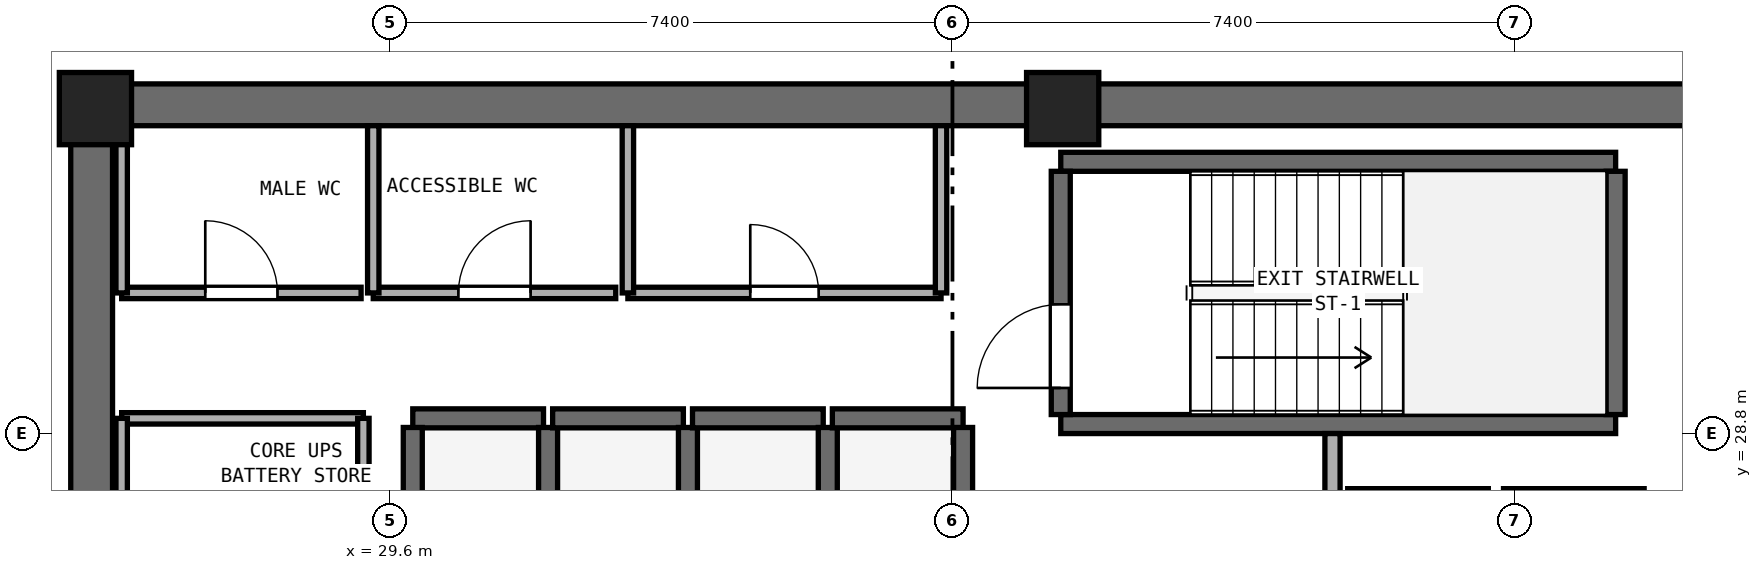
"""IFC4 building model, lengths in metres.
Left out: names, types, materials, properties, quantities, classifications, styles, units other than length and angle.
Written with IfcOpenShell. Run it as: python <this file> out.ifc"""

import sys

from ifc_helpers import new_model, si_unit, direction, frame, frame_2d, origin, origin_2d, place, context, subcontext, project, spatial, rectangle, extrude, element, fill, save


model = new_model("IFC4")
c1 = context("Model", 3, precision=1e-05, world=origin(), true_north=direction((0.0, 1.0)))
c2 = subcontext(c1, "Body", "Model", "MODEL_VIEW")
j1 = project(units=[si_unit("LENGTHUNIT", "METRE"), si_unit("PLANEANGLEUNIT", "RADIAN")], contexts=[c1])
p1 = place(None, origin())
s1 = spatial("IfcSite", under=j1, at=p1, CompositionType="ELEMENT")
p2 = place(p1, origin())
s2 = spatial("IfcBuilding", under=s1, at=p2, CompositionType="ELEMENT")
p3 = place(p2, frame((0.0, 0.0, 132.6)))
s3 = spatial("IfcBuildingStorey", under=s2, at=p3, CompositionType="ELEMENT", Elevation=132.6)
p4 = place(p3, frame((25.4, 33.125, 0.0), z_axis=(0.0, 0.0, 1.0), x_axis=(1.0, 0.0, 0.0)))
e1 = element("IfcWall", 1, at=p4, inside=s3, PredefinedType="SHEAR", context=c2, shape_type="SweptSolid", body=[
    extrude(rectangle(XDim=23.2, YDim=0.55, at=frame_2d((11.6, 0.0))), origin(), (0.0, 0.0, 1.0), 3.54),
])
p5 = place(p3, frame((25.675, 17.55, 0.0), z_axis=(0.0, 0.0, 1.0), x_axis=(0.0, 1.0, 0.0)))
e2 = element("IfcWall", 2, at=p5, inside=s3, PredefinedType="SHEAR", context=c2, shape_type="SweptSolid", body=[
    extrude(rectangle(XDim=15.3, YDim=0.55, at=frame_2d((7.65, 0.0))), origin(), (0.0, 0.0, 1.0), 3.54),
])
p6 = place(p5, frame((6.9, 0.0, 0.0)))
e3 = element("IfcOpeningElement", 3, at=p6, cuts=e2, PredefinedType="OPENING", context=c2, shape_type="SweptSolid", body=[
    extrude(rectangle(XDim=1.5, YDim=2.15, at=frame_2d((0.75, 1.075))), frame((0.0, 0.285, 0.0), z_axis=(0.0, -1.0, 0.0), x_axis=(1.0, 0.0, 0.0)), (0.0, 0.0, 1.0), 0.57),
])
for number, where, z_axis, x_axis in (
    (4, (38.45, 33.075, 0.0), (0.0, 0.0, 1.0), (1.0, 0.0, 0.0)),
    (5, (25.725, 33.075, 0.0), (0.0, 0.0, 1.0), (1.0, 0.0, 0.0)),
):
    element("IfcColumn", number, at=place(p3, frame(where, z_axis=z_axis, x_axis=x_axis)), inside=s3, PredefinedType="PILASTER", context=c2, shape_type="SweptSolid", body=[
        extrude(rectangle(XDim=0.95, YDim=0.95, at=origin_2d()), origin(), (0.0, 0.0, 1.0), 3.8),
    ])
for number, where, z_axis, x_axis in (
    (6, (38.425, 28.925, 0.0), (0.0, 0.0, 1.0), (1.0, 0.0, 0.0)),
    (7, (38.425, 32.375, 0.0), (0.0, 0.0, 1.0), (1.0, 0.0, 0.0)),
):
    element("IfcWall", number, at=place(p3, frame(where, z_axis=z_axis, x_axis=x_axis)), inside=s3, PredefinedType="SHEAR", context=c2, shape_type="SweptSolid", body=[
        extrude(rectangle(XDim=7.3, YDim=0.25, at=frame_2d((3.65, 0.0))), origin(), (0.0, 0.0, 1.0), 3.54),
    ])
p7 = place(p3, frame((38.425, 29.05, 0.0), z_axis=(0.0, 0.0, 1.0), x_axis=(0.0, 1.0, 0.0)))
e8 = element("IfcWall", 8, at=p7, inside=s3, PredefinedType="SHEAR", context=c2, shape_type="SweptSolid", body=[
    extrude(rectangle(XDim=3.2, YDim=0.25, at=frame_2d((1.6, 0.0))), origin(), (0.0, 0.0, 1.0), 3.54),
])
p8 = place(p7, frame((0.35, 0.0, 0.0)))
e9 = element("IfcOpeningElement", 9, at=p8, cuts=e8, PredefinedType="OPENING", context=c2, shape_type="SweptSolid", body=[
    extrude(rectangle(XDim=1.1, YDim=2.15, at=frame_2d((0.55, 1.075))), frame((0.0, 0.135, 0.0), z_axis=(0.0, -1.0, 0.0), x_axis=(1.0, 0.0, 0.0)), (0.0, 0.0, 1.0), 0.27),
])
p9 = place(p3, frame((45.725, 29.05, 0.0), z_axis=(0.0, 0.0, 1.0), x_axis=(0.0, 1.0, 0.0)))
e10 = element("IfcWall", 10, at=p9, inside=s3, PredefinedType="SHEAR", context=c2, shape_type="SweptSolid", body=[
    extrude(rectangle(XDim=3.2, YDim=0.25, at=frame_2d((1.6, 0.0))), origin(), (0.0, 0.0, 1.0), 3.54),
])
p10 = place(p3, frame((29.9, 29.0, 0.0), z_axis=(0.0, 0.0, 1.0), x_axis=(1.0, 0.0, 0.0)))
e11 = element("IfcWall", 11, at=p10, inside=s3, PredefinedType="SHEAR", context=c2, shape_type="SweptSolid", body=[
    extrude(rectangle(XDim=1.72, YDim=0.25, at=frame_2d((0.86, 0.0))), origin(), (0.0, 0.0, 1.0), 3.54),
])
for number, where, z_axis, x_axis in (
    (12, (29.9, 26.92, 0.0), (0.0, 0.0, 1.0), (0.0, 1.0, 0.0)),
    (13, (31.68, 26.92, 0.0), (0.0, 0.0, 1.0), (0.0, 1.0, 0.0)),
):
    element("IfcWall", number, at=place(p3, frame(where, z_axis=z_axis, x_axis=x_axis)), inside=s3, PredefinedType="SHEAR", context=c2, shape_type="SweptSolid", body=[
        extrude(rectangle(XDim=1.96, YDim=0.25, at=frame_2d((0.98, 0.0))), origin(), (0.0, 0.0, 1.0), 3.54),
    ])
p11 = place(p3, frame((31.74, 29.0, 0.0), z_axis=(0.0, 0.0, 1.0), x_axis=(1.0, 0.0, 0.0)))
e14 = element("IfcWall", 14, at=p11, inside=s3, PredefinedType="SHEAR", context=c2, shape_type="SweptSolid", body=[
    extrude(rectangle(XDim=1.72, YDim=0.25, at=frame_2d((0.86, 0.0))), origin(), (0.0, 0.0, 1.0), 3.54),
])
p12 = place(p3, frame((33.52, 26.92, 0.0), z_axis=(0.0, 0.0, 1.0), x_axis=(0.0, 1.0, 0.0)))
e15 = element("IfcWall", 15, at=p12, inside=s3, PredefinedType="SHEAR", context=c2, shape_type="SweptSolid", body=[
    extrude(rectangle(XDim=1.96, YDim=0.25, at=frame_2d((0.98, 0.0))), origin(), (0.0, 0.0, 1.0), 3.54),
])
p13 = place(p3, frame((33.58, 29.0, 0.0), z_axis=(0.0, 0.0, 1.0), x_axis=(1.0, 0.0, 0.0)))
e16 = element("IfcWall", 16, at=p13, inside=s3, PredefinedType="SHEAR", context=c2, shape_type="SweptSolid", body=[
    extrude(rectangle(XDim=1.72, YDim=0.25, at=frame_2d((0.86, 0.0))), origin(), (0.0, 0.0, 1.0), 3.54),
])
p14 = place(p3, frame((35.36, 26.92, 0.0), z_axis=(0.0, 0.0, 1.0), x_axis=(0.0, 1.0, 0.0)))
e17 = element("IfcWall", 17, at=p14, inside=s3, PredefinedType="SHEAR", context=c2, shape_type="SweptSolid", body=[
    extrude(rectangle(XDim=1.96, YDim=0.25, at=frame_2d((0.98, 0.0))), origin(), (0.0, 0.0, 1.0), 3.54),
])
p15 = place(p3, frame((35.42, 29.0, 0.0), z_axis=(0.0, 0.0, 1.0), x_axis=(1.0, 0.0, 0.0)))
e18 = element("IfcWall", 18, at=p15, inside=s3, PredefinedType="SHEAR", context=c2, shape_type="SweptSolid", body=[
    extrude(rectangle(XDim=1.72, YDim=0.25, at=frame_2d((0.86, 0.0))), origin(), (0.0, 0.0, 1.0), 3.54),
])
p16 = place(p3, frame((37.14, 26.92, 0.0), z_axis=(0.0, 0.0, 1.0), x_axis=(0.0, 1.0, 0.0)))
e19 = element("IfcWall", 19, at=p16, inside=s3, PredefinedType="SHEAR", context=c2, shape_type="SweptSolid", body=[
    extrude(rectangle(XDim=1.96, YDim=0.25, at=frame_2d((0.98, 0.0))), origin(), (0.0, 0.0, 1.0), 3.54),
])
for number, where, z_axis, x_axis in (
    (20, (42.2, 27.95, 0.0), (0.0, 0.0, 1.0), (1.0, 0.0, 0.0)),
    (21, (44.25, 27.95, 0.0), (0.0, 0.0, 1.0), (1.0, 0.0, 0.0)),
):
    element("IfcWall", number, at=place(p3, frame(where, z_axis=z_axis, x_axis=x_axis)), inside=s3, PredefinedType="SHEAR", context=c2, shape_type="SweptSolid", body=[
        extrude(rectangle(XDim=1.85, YDim=0.25, at=frame_2d((0.925, 0.0))), origin(), (0.0, 0.0, 1.0), 3.54),
    ])
p17 = place(p3, frame((42.0, 22.75, 0.0), z_axis=(0.0, 0.0, 1.0), x_axis=(0.0, 1.0, 0.0)))
e22 = element("IfcWall", 22, at=p17, inside=s3, PredefinedType="SOLIDWALL", context=c2, shape_type="SweptSolid", body=[
    extrude(rectangle(XDim=6.05, YDim=0.2, at=frame_2d((3.025, 0.0))), origin(), (0.0, 0.0, 1.0), 3.54),
])
p18 = place(p17, frame((0.65, 0.0, 0.0)))
e23 = element("IfcOpeningElement", 23, at=p18, cuts=e22, PredefinedType="OPENING", context=c2, shape_type="SweptSolid", body=[
    extrude(rectangle(XDim=1.2, YDim=2.15, at=frame_2d((0.6, 1.075))), frame((0.0, 0.11, 0.0), z_axis=(0.0, -1.0, 0.0), x_axis=(1.0, 0.0, 0.0)), (0.0, 0.0, 1.0), 0.22),
])
p19 = place(p3, frame((26.07, 30.65, 0.0), z_axis=(0.0, 0.0, 1.0), x_axis=(1.0, 0.0, 0.0)))
e24 = element("IfcWall", 24, at=p19, inside=s3, PredefinedType="PARTITIONING", context=c2, shape_type="SweptSolid", body=[
    extrude(rectangle(XDim=3.15, YDim=0.15, at=frame_2d((1.575, 0.0))), origin(), (0.0, 0.0, 1.0), 3.54),
])
p20 = place(p19, frame((1.1, 0.0, 0.0)))
e25 = element("IfcOpeningElement", 25, at=p20, cuts=e24, PredefinedType="OPENING", context=c2, shape_type="SweptSolid", body=[
    extrude(rectangle(XDim=0.95, YDim=2.1, at=frame_2d((0.475, 1.05))), frame((0.0, 0.085, 0.0), z_axis=(0.0, -1.0, 0.0), x_axis=(1.0, 0.0, 0.0)), (0.0, 0.0, 1.0), 0.17),
])
p21 = place(p3, frame((26.07, 30.65, 0.0), z_axis=(0.0, 0.0, 1.0), x_axis=(0.0, 1.0, 0.0)))
e26 = element("IfcWall", 26, at=p21, inside=s3, PredefinedType="PARTITIONING", context=c2, shape_type="SweptSolid", body=[
    extrude(rectangle(XDim=2.2, YDim=0.15, at=frame_2d((1.1, 0.0))), origin(), (0.0, 0.0, 1.0), 2.64),
])
p22 = place(p3, frame((29.38, 30.65, 0.0), z_axis=(0.0, 0.0, 1.0), x_axis=(1.0, 0.0, 0.0)))
e27 = element("IfcWall", 27, at=p22, inside=s3, PredefinedType="PARTITIONING", context=c2, shape_type="SweptSolid", body=[
    extrude(rectangle(XDim=3.19, YDim=0.15, at=frame_2d((1.595, 0.0))), origin(), (0.0, 0.0, 1.0), 3.54),
])
p23 = place(p22, frame((1.12, 0.0, 0.0)))
e28 = element("IfcOpeningElement", 28, at=p23, cuts=e27, PredefinedType="OPENING", context=c2, shape_type="SweptSolid", body=[
    extrude(rectangle(XDim=0.95, YDim=2.1, at=frame_2d((0.475, 1.05))), frame((0.0, 0.085, 0.0), z_axis=(0.0, -1.0, 0.0), x_axis=(1.0, 0.0, 0.0)), (0.0, 0.0, 1.0), 0.17),
])
p24 = place(p3, frame((29.38, 30.65, 0.0), z_axis=(0.0, 0.0, 1.0), x_axis=(0.0, 1.0, 0.0)))
e29 = element("IfcWall", 29, at=p24, inside=s3, PredefinedType="PARTITIONING", context=c2, shape_type="SweptSolid", body=[
    extrude(rectangle(XDim=2.2, YDim=0.15, at=frame_2d((1.1, 0.0))), origin(), (0.0, 0.0, 1.0), 3.54),
])
p25 = place(p3, frame((32.73, 30.65, 0.0), z_axis=(0.0, 0.0, 1.0), x_axis=(1.0, 0.0, 0.0)))
e30 = element("IfcWall", 30, at=p25, inside=s3, PredefinedType="PARTITIONING", context=c2, shape_type="SweptSolid", body=[
    extrude(rectangle(XDim=4.12, YDim=0.15, at=frame_2d((2.06, 0.0))), origin(), (0.0, 0.0, 1.0), 3.54),
])
p26 = place(p25, frame((1.61, 0.0, 0.0)))
e31 = element("IfcOpeningElement", 31, at=p26, cuts=e30, PredefinedType="OPENING", context=c2, shape_type="SweptSolid", body=[
    extrude(rectangle(XDim=0.9, YDim=2.1, at=frame_2d((0.45, 1.05))), frame((0.0, 0.085, 0.0), z_axis=(0.0, -1.0, 0.0), x_axis=(1.0, 0.0, 0.0)), (0.0, 0.0, 1.0), 0.17),
])
for number, where, z_axis, x_axis in (
    (32, (32.73, 30.65, 0.0), (0.0, 0.0, 1.0), (0.0, 1.0, 0.0)),
    (33, (36.85, 30.65, 0.0), (0.0, 0.0, 1.0), (0.0, 1.0, 0.0)),
):
    element("IfcWall", number, at=place(p3, frame(where, z_axis=z_axis, x_axis=x_axis)), inside=s3, PredefinedType="PARTITIONING", context=c2, shape_type="SweptSolid", body=[
        extrude(rectangle(XDim=2.2, YDim=0.15, at=frame_2d((1.1, 0.0))), origin(), (0.0, 0.0, 1.0), 3.54),
    ])
p27 = place(p3, frame((26.07, 29.0, 0.0), z_axis=(0.0, 0.0, 1.0), x_axis=(1.0, 0.0, 0.0)))
e34 = element("IfcWall", 34, at=p27, inside=s3, PredefinedType="PARTITIONING", context=c2, shape_type="SweptSolid", body=[
    extrude(rectangle(XDim=3.18, YDim=0.15, at=frame_2d((1.59, 0.0))), origin(), (0.0, 0.0, 1.0), 3.54),
])
p28 = place(p3, frame((26.07, 26.8, 0.0), z_axis=(0.0, 0.0, 1.0), x_axis=(0.0, 1.0, 0.0)))
e35 = element("IfcWall", 35, at=p28, inside=s3, PredefinedType="PARTITIONING", context=c2, shape_type="SweptSolid", body=[
    extrude(rectangle(XDim=2.2, YDim=0.15, at=frame_2d((1.1, 0.0))), origin(), (0.0, 0.0, 1.0), 2.64),
])
p29 = place(p3, frame((29.25, 26.8, 0.0), z_axis=(0.0, 0.0, 1.0), x_axis=(0.0, 1.0, 0.0)))
e36 = element("IfcWall", 36, at=p29, inside=s3, PredefinedType="PARTITIONING", context=c2, shape_type="SweptSolid", body=[
    extrude(rectangle(XDim=2.2, YDim=0.15, at=frame_2d((1.1, 0.0))), origin(), (0.0, 0.0, 1.0), 3.54),
])
p30 = place(p8, origin())
e37 = element("IfcDoor", 37, at=p30, inside=s3, OperationType="SINGLE_SWING_LEFT", PredefinedType="DOOR", context=c2, shape_type="SweptSolid", body=[
    extrude(rectangle(XDim=1.1, YDim=2.15, at=frame_2d((0.55, 1.075))), frame((0.0, 0.025, 0.0), z_axis=(0.0, -1.0, 0.0), x_axis=(1.0, 0.0, 0.0)), (0.0, 0.0, 1.0), 0.05),
])
fill(e9, e37)
p31 = place(p20, origin())
e38 = element("IfcDoor", 38, at=p31, inside=s3, OperationType="SINGLE_SWING_LEFT", PredefinedType="DOOR", context=c2, shape_type="SweptSolid", body=[
    extrude(rectangle(XDim=0.95, YDim=2.1, at=frame_2d((0.475, 1.05))), frame((0.0, 0.025, 0.0), z_axis=(0.0, -1.0, 0.0), x_axis=(1.0, 0.0, 0.0)), (0.0, 0.0, 1.0), 0.05),
])
fill(e25, e38)
p32 = place(p23, origin())
e39 = element("IfcDoor", 39, at=p32, inside=s3, OperationType="SINGLE_SWING_RIGHT", PredefinedType="DOOR", context=c2, shape_type="SweptSolid", body=[
    extrude(rectangle(XDim=0.95, YDim=2.1, at=frame_2d((0.475, 1.05))), frame((0.0, 0.025, 0.0), z_axis=(0.0, -1.0, 0.0), x_axis=(1.0, 0.0, 0.0)), (0.0, 0.0, 1.0), 0.05),
])
fill(e28, e39)
p33 = place(p26, origin())
e40 = element("IfcDoor", 40, at=p33, inside=s3, OperationType="SINGLE_SWING_LEFT", PredefinedType="DOOR", context=c2, shape_type="SweptSolid", body=[
    extrude(rectangle(XDim=0.9, YDim=2.1, at=frame_2d((0.45, 1.05))), frame((0.0, 0.025, 0.0), z_axis=(0.0, -1.0, 0.0), x_axis=(1.0, 0.0, 0.0)), (0.0, 0.0, 1.0), 0.05),
])
fill(e31, e40)
save(model, sys.argv[1])
